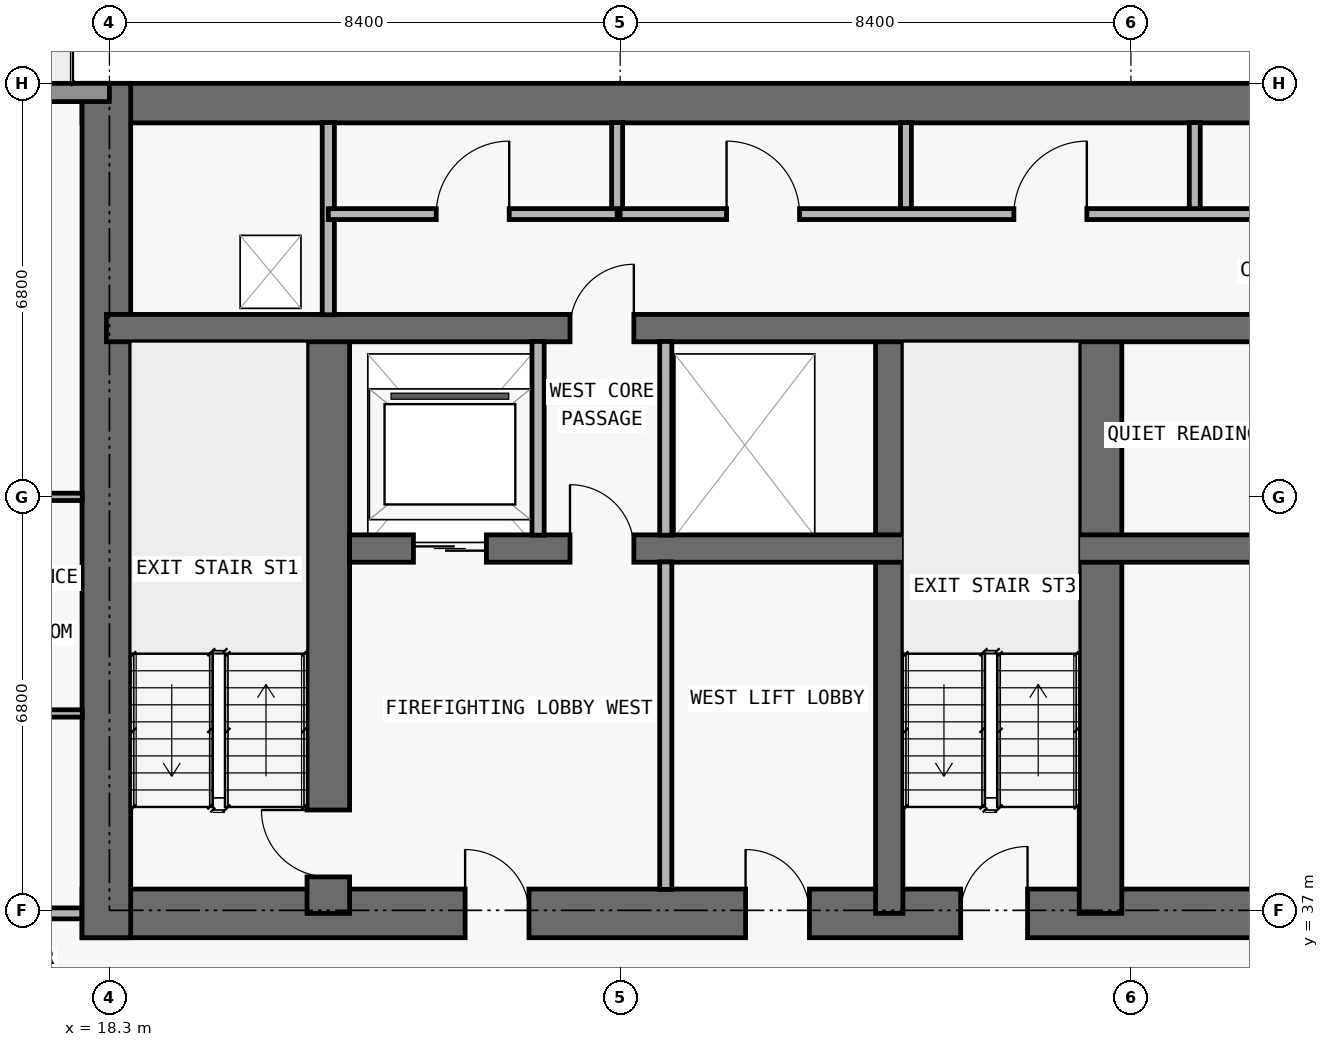
"""IFC4 building model, lengths in metres.
Left out: names, types, materials, properties, quantities, classifications, styles, units other than length and angle.
Written with IfcOpenShell. Run it as: python <this file> out.ifc"""

import sys

from ifc_helpers import new_model, si_unit, direction, frame, frame_2d, origin, place, context, subcontext, project, spatial, rectangle, extrude, element, fill, save


model = new_model("IFC4")
c1 = context("Model", 3, precision=1e-05, world=origin(), true_north=direction((0.0, 1.0)))
c2 = subcontext(c1, "Body", "Model", "MODEL_VIEW")
j1 = project(units=[si_unit("LENGTHUNIT", "METRE"), si_unit("PLANEANGLEUNIT", "RADIAN")], contexts=[c1])
p1 = place(None, origin())
s1 = spatial("IfcSite", under=j1, at=p1, CompositionType="ELEMENT")
p2 = place(p1, origin())
s2 = spatial("IfcBuilding", under=s1, at=p2, CompositionType="ELEMENT")
p3 = place(p2, frame((0.0, 0.0, 129.0)))
s3 = spatial("IfcBuildingStorey", under=s2, at=p3, CompositionType="ELEMENT", Elevation=129.0)
p4 = place(p3, frame((17.85, 36.95, 0.0), z_axis=(0.0, 0.0, 1.0), x_axis=(1.0, 0.0, 0.0)))
e1 = element("IfcWall", 1, at=p4, inside=s3, PredefinedType="SHEAR", context=c2, shape_type="SweptSolid", body=[
    extrude(rectangle(XDim=42.1, YDim=0.8, at=frame_2d((21.05, 0.0))), origin(), (0.0, 0.0, 1.0), 3.05),
])
p5 = place(p4, frame((14.45, 0.0, 0.0)))
e2 = element("IfcOpeningElement", 2, at=p5, cuts=e1, PredefinedType="OPENING", context=c2, shape_type="SweptSolid", body=[
    extrude(rectangle(XDim=1.1, YDim=2.15, at=frame_2d((0.55, 1.075))), frame((0.0, 0.41, 0.0), z_axis=(0.0, -1.0, 0.0), x_axis=(1.0, 0.0, 0.0)), (0.0, 0.0, 1.0), 0.82),
])
p6 = place(p4, frame((6.3, 0.0, 0.0)))
e3 = element("IfcOpeningElement", 3, at=p6, cuts=e1, PredefinedType="OPENING", context=c2, shape_type="SweptSolid", body=[
    extrude(rectangle(XDim=1.05, YDim=2.15, at=frame_2d((0.525, 1.075))), frame((0.0, 0.41, 0.0), z_axis=(0.0, -1.0, 0.0), x_axis=(1.0, 0.0, 0.0)), (0.0, 0.0, 1.0), 0.82),
])
p7 = place(p4, frame((34.8, 0.0, 0.0)))
e4 = element("IfcOpeningElement", 4, at=p7, cuts=e1, PredefinedType="OPENING", context=c2, shape_type="SweptSolid", body=[
    extrude(rectangle(XDim=1.05, YDim=2.15, at=frame_2d((0.525, 1.075))), frame((0.0, 0.41, 0.0), z_axis=(0.0, -1.0, 0.0), x_axis=(1.0, 0.0, 0.0)), (0.0, 0.0, 1.0), 0.82),
])
p8 = place(p4, frame((10.913, 0.0, 0.0)))
e5 = element("IfcOpeningElement", 5, at=p8, cuts=e1, PredefinedType="OPENING", context=c2, shape_type="SweptSolid", body=[
    extrude(rectangle(XDim=1.05, YDim=2.15, at=frame_2d((0.525, 1.075))), frame((0.0, 0.41, 0.0), z_axis=(0.0, -1.0, 0.0), x_axis=(1.0, 0.0, 0.0)), (0.0, 0.0, 1.0), 0.82),
])
p9 = place(p4, frame((24.15, 0.0, 0.0)))
e6 = element("IfcOpeningElement", 6, at=p9, cuts=e1, PredefinedType="OPENING", context=c2, shape_type="SweptSolid", body=[
    extrude(rectangle(XDim=1.05, YDim=2.15, at=frame_2d((0.525, 1.075))), frame((0.0, 0.41, 0.0), z_axis=(0.0, -1.0, 0.0), x_axis=(1.0, 0.0, 0.0)), (0.0, 0.0, 1.0), 0.82),
])
p10 = place(p3, frame((17.85, 50.275, 0.0), z_axis=(0.0, 0.0, 1.0), x_axis=(1.0, 0.0, 0.0)))
e7 = element("IfcWall", 7, at=p10, inside=s3, PredefinedType="SHEAR", context=c2, shape_type="SweptSolid", body=[
    extrude(rectangle(XDim=42.1, YDim=0.65, at=frame_2d((21.05, 0.0))), origin(), (0.0, 0.0, 1.0), 3.05),
])
p11 = place(p3, frame((18.25, 36.55, 0.0), z_axis=(0.0, 0.0, 1.0), x_axis=(0.0, 1.0, 0.0)))
e8 = element("IfcWall", 8, at=p11, inside=s3, PredefinedType="SHEAR", context=c2, shape_type="SweptSolid", body=[
    extrude(rectangle(XDim=14.05, YDim=0.8, at=frame_2d((7.025, 0.0))), origin(), (0.0, 0.0, 1.0), 3.05),
])
p12 = place(p3, frame((21.9, 36.95, 0.0), z_axis=(0.0, 0.0, 1.0), x_axis=(0.0, 1.0, 0.0)))
e9 = element("IfcWall", 9, at=p12, inside=s3, PredefinedType="SHEAR", context=c2, shape_type="SweptSolid", body=[
    extrude(rectangle(XDim=9.625, YDim=0.7, at=frame_2d((4.812, 0.0))), origin(), (0.0, 0.0, 1.0), 3.05),
])
p13 = place(p12, frame((0.6, 0.0, 0.0)))
e10 = element("IfcOpeningElement", 10, at=p13, cuts=e9, PredefinedType="OPENING", context=c2, shape_type="SweptSolid", body=[
    extrude(rectangle(XDim=1.1, YDim=2.15, at=frame_2d((0.55, 1.075))), frame((0.0, 0.36, 0.0), z_axis=(0.0, -1.0, 0.0), x_axis=(1.0, 0.0, 0.0)), (0.0, 0.0, 1.0), 0.72),
])
p14 = place(p3, frame((31.125, 36.95, 0.0), z_axis=(0.0, 0.0, 1.0), x_axis=(0.0, 1.0, 0.0)))
e11 = element("IfcWall", 11, at=p14, inside=s3, PredefinedType="SHEAR", context=c2, shape_type="SweptSolid", body=[
    extrude(rectangle(XDim=9.625, YDim=0.45, at=frame_2d((4.812, 0.0))), origin(), (0.0, 0.0, 1.0), 3.05),
])
p15 = place(p3, frame((34.6, 36.95, 0.0), z_axis=(0.0, 0.0, 1.0), x_axis=(0.0, 1.0, 0.0)))
e12 = element("IfcWall", 12, at=p15, inside=s3, PredefinedType="SHEAR", context=c2, shape_type="SweptSolid", body=[
    extrude(rectangle(XDim=9.625, YDim=0.7, at=frame_2d((4.812, 0.0))), origin(), (0.0, 0.0, 1.0), 3.05),
])
p16 = place(p3, frame((22.25, 42.95, 0.0), z_axis=(0.0, 0.0, 1.0), x_axis=(1.0, 0.0, 0.0)))
e13 = element("IfcWall", 13, at=p16, inside=s3, PredefinedType="SHEAR", context=c2, shape_type="SweptSolid", body=[
    extrude(rectangle(XDim=33.3, YDim=0.45, at=frame_2d((16.65, 0.0))), origin(), (0.0, 0.0, 1.0), 3.05),
])
p17 = place(p16, frame((1.05, 0.0, 0.0)))
e14 = element("IfcOpeningElement", 14, at=p17, cuts=e13, PredefinedType="OPENING", context=c2, shape_type="SweptSolid", body=[
    extrude(rectangle(XDim=1.2, YDim=2.2, at=frame_2d((0.6, 1.1))), frame((0.0, 0.235, 0.0), z_axis=(0.0, -1.0, 0.0), x_axis=(1.0, 0.0, 0.0)), (0.0, 0.0, 1.0), 0.47),
])
p18 = place(p16, frame((31.05, 0.0, 0.0)))
e15 = element("IfcOpeningElement", 15, at=p18, cuts=e13, PredefinedType="OPENING", context=c2, shape_type="SweptSolid", body=[
    extrude(rectangle(XDim=1.2, YDim=2.2, at=frame_2d((0.6, 1.1))), frame((0.0, 0.235, 0.0), z_axis=(0.0, -1.0, 0.0), x_axis=(1.0, 0.0, 0.0)), (0.0, 0.0, 1.0), 0.47),
])
p19 = place(p16, frame((21.4, 0.0, 0.0)))
e16 = element("IfcOpeningElement", 16, at=p19, cuts=e13, PredefinedType="OPENING", context=c2, shape_type="SweptSolid", body=[
    extrude(rectangle(XDim=1.1, YDim=2.2, at=frame_2d((0.55, 1.1))), frame((0.0, 0.235, 0.0), z_axis=(0.0, -1.0, 0.0), x_axis=(1.0, 0.0, 0.0)), (0.0, 0.0, 1.0), 0.47),
])
p20 = place(p16, frame((24.0, 0.0, 0.0)))
e17 = element("IfcOpeningElement", 17, at=p20, cuts=e13, PredefinedType="OPENING", context=c2, shape_type="SweptSolid", body=[
    extrude(rectangle(XDim=1.1, YDim=2.2, at=frame_2d((0.55, 1.1))), frame((0.0, 0.235, 0.0), z_axis=(0.0, -1.0, 0.0), x_axis=(1.0, 0.0, 0.0)), (0.0, 0.0, 1.0), 0.47),
])
p21 = place(p16, frame((3.625, 0.0, 0.0)))
e18 = element("IfcOpeningElement", 18, at=p21, cuts=e13, PredefinedType="OPENING", context=c2, shape_type="SweptSolid", body=[
    extrude(rectangle(XDim=1.05, YDim=2.15, at=frame_2d((0.525, 1.075))), frame((0.0, 0.235, 0.0), z_axis=(0.0, -1.0, 0.0), x_axis=(1.0, 0.0, 0.0)), (0.0, 0.0, 1.0), 0.47),
])
p22 = place(p16, frame((28.675, 0.0, 0.0)))
e19 = element("IfcOpeningElement", 19, at=p22, cuts=e13, PredefinedType="OPENING", context=c2, shape_type="SweptSolid", body=[
    extrude(rectangle(XDim=1.05, YDim=2.15, at=frame_2d((0.525, 1.075))), frame((0.0, 0.235, 0.0), z_axis=(0.0, -1.0, 0.0), x_axis=(1.0, 0.0, 0.0)), (0.0, 0.0, 1.0), 0.47),
])
p23 = place(p16, frame((15.975, 0.0, 0.0)))
e20 = element("IfcOpeningElement", 20, at=p23, cuts=e13, PredefinedType="OPENING", context=c2, shape_type="SweptSolid", body=[
    extrude(rectangle(XDim=1.0, YDim=2.2, at=frame_2d((0.5, 1.1))), frame((0.0, 0.235, 0.0), z_axis=(0.0, -1.0, 0.0), x_axis=(1.0, 0.0, 0.0)), (0.0, 0.0, 1.0), 0.47),
])
p24 = place(p3, frame((18.25, 46.575, 0.0), z_axis=(0.0, 0.0, 1.0), x_axis=(1.0, 0.0, 0.0)))
e21 = element("IfcWall", 21, at=p24, inside=s3, PredefinedType="SHEAR", context=c2, shape_type="SweptSolid", body=[
    extrude(rectangle(XDim=41.3, YDim=0.45, at=frame_2d((20.65, 0.0))), origin(), (0.0, 0.0, 1.0), 3.05),
])
p25 = place(p24, frame((7.625, 0.0, 0.0)))
e22 = element("IfcOpeningElement", 22, at=p25, cuts=e21, PredefinedType="OPENING", context=c2, shape_type="SweptSolid", body=[
    extrude(rectangle(XDim=1.05, YDim=2.15, at=frame_2d((0.525, 1.075))), frame((0.0, 0.235, 0.0), z_axis=(0.0, -1.0, 0.0), x_axis=(1.0, 0.0, 0.0)), (0.0, 0.0, 1.0), 0.47),
])
p26 = place(p24, frame((32.675, 0.0, 0.0)))
e23 = element("IfcOpeningElement", 23, at=p26, cuts=e21, PredefinedType="OPENING", context=c2, shape_type="SweptSolid", body=[
    extrude(rectangle(XDim=1.05, YDim=2.15, at=frame_2d((0.525, 1.075))), frame((0.0, 0.235, 0.0), z_axis=(0.0, -1.0, 0.0), x_axis=(1.0, 0.0, 0.0)), (0.0, 0.0, 1.0), 0.47),
])
p27 = place(p3, frame((7.7, 50.45, 0.0), z_axis=(0.0, 0.0, 1.0), x_axis=(1.0, 0.0, 0.0)))
e24 = element("IfcWall", 24, at=p27, inside=s3, PredefinedType="STANDARD", context=c2, shape_type="SweptSolid", body=[
    extrude(rectangle(XDim=10.6, YDim=0.3, at=frame_2d((5.3, 0.0))), origin(), (0.0, 0.0, 1.0), 3.05),
])
p28 = place(p27, frame((4.3, 0.0, 0.0)))
e25 = element("IfcOpeningElement", 25, at=p28, cuts=e24, PredefinedType="OPENING", context=c2, shape_type="SweptSolid", body=[
    extrude(rectangle(XDim=2.0, YDim=2.3, at=frame_2d((1.0, 1.15))), frame((0.0, 0.16, 0.0), z_axis=(0.0, -1.0, 0.0), x_axis=(1.0, 0.0, 0.0)), (0.0, 0.0, 1.0), 0.32),
])
p29 = place(p3, frame((21.9, 46.795, 0.0), z_axis=(0.0, 0.0, 1.0), x_axis=(0.0, 1.0, 0.0)))
e26 = element("IfcWall", 26, at=p29, inside=s3, PredefinedType="PARTITIONING", context=c2, shape_type="SweptSolid", body=[
    extrude(rectangle(XDim=3.16, YDim=0.2, at=frame_2d((1.58, 0.0))), origin(), (0.0, 0.0, 1.0), 3.05),
])
p30 = place(p3, frame((25.35, 43.17, 0.0), z_axis=(0.0, 0.0, 1.0), x_axis=(0.0, 1.0, 0.0)))
e27 = element("IfcWall", 27, at=p30, inside=s3, PredefinedType="PARTITIONING", context=c2, shape_type="SweptSolid", body=[
    extrude(rectangle(XDim=3.185, YDim=0.2, at=frame_2d((1.593, 0.0))), origin(), (0.0, 0.0, 1.0), 3.05),
])
p31 = place(p3, frame((26.65, 48.45, 0.0), z_axis=(0.0, 0.0, 1.0), x_axis=(0.0, 1.0, 0.0)))
e28 = element("IfcWall", 28, at=p31, inside=s3, PredefinedType="PARTITIONING", context=c2, shape_type="SweptSolid", body=[
    extrude(rectangle(XDim=1.505, YDim=0.18, at=frame_2d((0.752, 0.0))), origin(), (0.0, 0.0, 1.0), 3.05),
])
p32 = place(p3, frame((27.45, 37.345, 0.0), z_axis=(0.0, 0.0, 1.0), x_axis=(0.0, 1.0, 0.0)))
e29 = element("IfcWall", 29, at=p32, inside=s3, PredefinedType="PARTITIONING", context=c2, shape_type="SweptSolid", body=[
    extrude(rectangle(XDim=5.385, YDim=0.2, at=frame_2d((2.692, 0.0))), origin(), (0.0, 0.0, 1.0), 3.05),
])
p33 = place(p3, frame((27.45, 43.17, 0.0), z_axis=(0.0, 0.0, 1.0), x_axis=(0.0, 1.0, 0.0)))
e30 = element("IfcWall", 30, at=p33, inside=s3, PredefinedType="PARTITIONING", context=c2, shape_type="SweptSolid", body=[
    extrude(rectangle(XDim=3.185, YDim=0.2, at=frame_2d((1.593, 0.0))), origin(), (0.0, 0.0, 1.0), 3.05),
])
for number, where, z_axis, x_axis in (
    (31, (31.4, 48.45, 0.0), (0.0, 0.0, 1.0), (0.0, 1.0, 0.0)),
    (32, (36.15, 48.45, 0.0), (0.0, 0.0, 1.0), (0.0, 1.0, 0.0)),
):
    element("IfcWall", number, at=place(p3, frame(where, z_axis=z_axis, x_axis=x_axis)), inside=s3, PredefinedType="PARTITIONING", context=c2, shape_type="SweptSolid", body=[
        extrude(rectangle(XDim=1.505, YDim=0.18, at=frame_2d((0.752, 0.0))), origin(), (0.0, 0.0, 1.0), 3.05),
    ])
p34 = place(p3, frame((7.7, 36.95, 0.0), z_axis=(0.0, 0.0, 1.0), x_axis=(1.0, 0.0, 0.0)))
e33 = element("IfcWall", 33, at=p34, inside=s3, PredefinedType="PARTITIONING", context=c2, shape_type="SweptSolid", body=[
    extrude(rectangle(XDim=10.145, YDim=0.18, at=frame_2d((5.073, 0.0))), origin(), (0.0, 0.0, 1.0), 3.05),
])
p35 = place(p34, frame((5.188, 0.0, 0.0)))
e34 = element("IfcOpeningElement", 34, at=p35, cuts=e33, PredefinedType="OPENING", context=c2, shape_type="SweptSolid", body=[
    extrude(rectangle(XDim=1.0, YDim=2.2, at=frame_2d((0.5, 1.1))), frame((0.0, 0.1, 0.0), z_axis=(0.0, -1.0, 0.0), x_axis=(1.0, 0.0, 0.0)), (0.0, 0.0, 1.0), 0.2),
])
p36 = place(p3, frame((15.6, 40.238, 0.0), z_axis=(0.0, 0.0, 1.0), x_axis=(1.0, 0.0, 0.0)))
e35 = element("IfcWall", 35, at=p36, inside=s3, PredefinedType="PARTITIONING", context=c2, shape_type="SweptSolid", body=[
    extrude(rectangle(XDim=2.255, YDim=0.12, at=frame_2d((1.127, 0.0))), origin(), (0.0, 0.0, 1.0), 3.05),
])
p37 = place(p3, frame((4.195, 43.8, 0.0), z_axis=(0.0, 0.0, 1.0), x_axis=(1.0, 0.0, 0.0)))
e36 = element("IfcWall", 36, at=p37, inside=s3, PredefinedType="PARTITIONING", context=c2, shape_type="SweptSolid", body=[
    extrude(rectangle(XDim=13.66, YDim=0.12, at=frame_2d((6.83, 0.0))), origin(), (0.0, 0.0, 1.0), 2.339),
])
p38 = place(p37, frame((8.743, 0.0, 0.0)))
e37 = element("IfcOpeningElement", 37, at=p38, cuts=e36, PredefinedType="OPENING", context=c2, shape_type="SweptSolid", body=[
    extrude(rectangle(XDim=0.9, YDim=2.15, at=frame_2d((0.45, 1.075))), frame((0.0, 0.07, 0.0), z_axis=(0.0, -1.0, 0.0), x_axis=(1.0, 0.0, 0.0)), (0.0, 0.0, 1.0), 0.14),
])
p39 = place(p37, frame((12.107, 0.0, 0.0)))
e38 = element("IfcOpeningElement", 38, at=p39, cuts=e36, PredefinedType="OPENING", context=c2, shape_type="SweptSolid", body=[
    extrude(rectangle(XDim=0.85, YDim=2.1, at=frame_2d((0.425, 1.05))), frame((0.0, 0.07, 0.0), z_axis=(0.0, -1.0, 0.0), x_axis=(1.0, 0.0, 0.0)), (0.0, 0.0, 1.0), 0.14),
])
p40 = place(p3, frame((21.9, 48.45, 0.0), z_axis=(0.0, 0.0, 1.0), x_axis=(1.0, 0.0, 0.0)))
e39 = element("IfcWall", 39, at=p40, inside=s3, PredefinedType="PARTITIONING", context=c2, shape_type="SweptSolid", body=[
    extrude(rectangle(XDim=4.75, YDim=0.18, at=frame_2d((2.375, 0.0))), origin(), (0.0, 0.0, 1.0), 3.05),
])
p41 = place(p40, frame((1.775, 0.0, 0.0)))
e40 = element("IfcOpeningElement", 40, at=p41, cuts=e39, PredefinedType="OPENING", context=c2, shape_type="SweptSolid", body=[
    extrude(rectangle(XDim=1.2, YDim=2.2, at=frame_2d((0.6, 1.1))), frame((0.0, 0.1, 0.0), z_axis=(0.0, -1.0, 0.0), x_axis=(1.0, 0.0, 0.0)), (0.0, 0.0, 1.0), 0.2),
])
p42 = place(p3, frame((26.7, 48.45, 0.0), z_axis=(0.0, 0.0, 1.0), x_axis=(1.0, 0.0, 0.0)))
e41 = element("IfcWall", 41, at=p42, inside=s3, PredefinedType="PARTITIONING", context=c2, shape_type="SweptSolid", body=[
    extrude(rectangle(XDim=29.2, YDim=0.18, at=frame_2d((14.6, 0.0))), origin(), (0.0, 0.0, 1.0), 3.05),
])
p43 = place(p42, frame((1.75, 0.0, 0.0)))
e42 = element("IfcOpeningElement", 42, at=p43, cuts=e41, PredefinedType="OPENING", context=c2, shape_type="SweptSolid", body=[
    extrude(rectangle(XDim=1.2, YDim=2.2, at=frame_2d((0.6, 1.1))), frame((0.0, 0.1, 0.0), z_axis=(0.0, -1.0, 0.0), x_axis=(1.0, 0.0, 0.0)), (0.0, 0.0, 1.0), 0.2),
])
p44 = place(p42, frame((6.475, 0.0, 0.0)))
e43 = element("IfcOpeningElement", 43, at=p44, cuts=e41, PredefinedType="OPENING", context=c2, shape_type="SweptSolid", body=[
    extrude(rectangle(XDim=1.2, YDim=2.2, at=frame_2d((0.6, 1.1))), frame((0.0, 0.1, 0.0), z_axis=(0.0, -1.0, 0.0), x_axis=(1.0, 0.0, 0.0)), (0.0, 0.0, 1.0), 0.2),
])
p45 = place(p42, frame((14.05, 0.0, 0.0)))
e44 = element("IfcOpeningElement", 44, at=p45, cuts=e41, PredefinedType="OPENING", context=c2, shape_type="SweptSolid", body=[
    extrude(rectangle(XDim=1.0, YDim=2.2, at=frame_2d((0.5, 1.1))), frame((0.0, 0.1, 0.0), z_axis=(0.0, -1.0, 0.0), x_axis=(1.0, 0.0, 0.0)), (0.0, 0.0, 1.0), 0.2),
])
p46 = place(p42, frame((21.425, 0.0, 0.0)))
e45 = element("IfcOpeningElement", 45, at=p46, cuts=e41, PredefinedType="OPENING", context=c2, shape_type="SweptSolid", body=[
    extrude(rectangle(XDim=1.2, YDim=2.2, at=frame_2d((0.6, 1.1))), frame((0.0, 0.1, 0.0), z_axis=(0.0, -1.0, 0.0), x_axis=(1.0, 0.0, 0.0)), (0.0, 0.0, 1.0), 0.2),
])
p47 = place(p42, frame((26.375, 0.0, 0.0)))
e46 = element("IfcOpeningElement", 46, at=p47, cuts=e41, PredefinedType="OPENING", context=c2, shape_type="SweptSolid", body=[
    extrude(rectangle(XDim=0.85, YDim=2.1, at=frame_2d((0.425, 1.05))), frame((0.0, 0.1, 0.0), z_axis=(0.0, -1.0, 0.0), x_axis=(1.0, 0.0, 0.0)), (0.0, 0.0, 1.0), 0.2),
])
p48 = place(p17, origin())
e47 = element("IfcDoor", 47, at=p48, inside=s3, OperationType="DOUBLE_DOOR_SLIDING", PredefinedType="DOOR", context=c2, shape_type="SweptSolid", body=[
    extrude(rectangle(XDim=1.2, YDim=2.2, at=frame_2d((0.6, 1.1))), frame((0.0, 0.025, 0.0), z_axis=(0.0, -1.0, 0.0), x_axis=(1.0, 0.0, 0.0)), (0.0, 0.0, 1.0), 0.05),
])
fill(e14, e47)
p49 = place(p5, origin())
e48 = element("IfcDoor", 48, at=p49, inside=s3, OperationType="SINGLE_SWING_RIGHT", PredefinedType="DOOR", context=c2, shape_type="SweptSolid", body=[
    extrude(rectangle(XDim=1.1, YDim=2.15, at=frame_2d((0.55, 1.075))), frame((0.0, 0.025, 0.0), z_axis=(0.0, -1.0, 0.0), x_axis=(1.0, 0.0, 0.0)), (0.0, 0.0, 1.0), 0.05),
])
fill(e2, e48)
p50 = place(p6, origin())
e49 = element("IfcDoor", 49, at=p50, inside=s3, OperationType="SINGLE_SWING_LEFT", PredefinedType="DOOR", context=c2, shape_type="SweptSolid", body=[
    extrude(rectangle(XDim=1.05, YDim=2.15, at=frame_2d((0.525, 1.075))), frame((0.0, 0.025, 0.0), z_axis=(0.0, -1.0, 0.0), x_axis=(1.0, 0.0, 0.0)), (0.0, 0.0, 1.0), 0.05),
])
fill(e3, e49)
p51 = place(p13, origin())
e50 = element("IfcDoor", 50, at=p51, inside=s3, OperationType="SINGLE_SWING_RIGHT", PredefinedType="DOOR", context=c2, shape_type="SweptSolid", body=[
    extrude(rectangle(XDim=1.1, YDim=2.15, at=frame_2d((0.55, 1.075))), frame((0.0, 0.025, 0.0), z_axis=(0.0, -1.0, 0.0), x_axis=(1.0, 0.0, 0.0)), (0.0, 0.0, 1.0), 0.05),
])
fill(e10, e50)
p52 = place(p21, origin())
e51 = element("IfcDoor", 51, at=p52, inside=s3, OperationType="SINGLE_SWING_LEFT", PredefinedType="DOOR", context=c2, shape_type="SweptSolid", body=[
    extrude(rectangle(XDim=1.05, YDim=2.15, at=frame_2d((0.525, 1.075))), frame((0.0, 0.025, 0.0), z_axis=(0.0, -1.0, 0.0), x_axis=(1.0, 0.0, 0.0)), (0.0, 0.0, 1.0), 0.05),
])
fill(e18, e51)
p53 = place(p8, origin())
e52 = element("IfcDoor", 52, at=p53, inside=s3, OperationType="SINGLE_SWING_LEFT", PredefinedType="DOOR", context=c2, shape_type="SweptSolid", body=[
    extrude(rectangle(XDim=1.05, YDim=2.15, at=frame_2d((0.525, 1.075))), frame((0.0, 0.025, 0.0), z_axis=(0.0, -1.0, 0.0), x_axis=(1.0, 0.0, 0.0)), (0.0, 0.0, 1.0), 0.05),
])
fill(e5, e52)
p54 = place(p25, origin())
e53 = element("IfcDoor", 53, at=p54, inside=s3, OperationType="SINGLE_SWING_RIGHT", PredefinedType="DOOR", context=c2, shape_type="SweptSolid", body=[
    extrude(rectangle(XDim=1.05, YDim=2.15, at=frame_2d((0.525, 1.075))), frame((0.0, 0.025, 0.0), z_axis=(0.0, -1.0, 0.0), x_axis=(1.0, 0.0, 0.0)), (0.0, 0.0, 1.0), 0.05),
])
fill(e22, e53)
p55 = place(p41, origin())
e54 = element("IfcDoor", 54, at=p55, inside=s3, OperationType="SINGLE_SWING_RIGHT", PredefinedType="DOOR", context=c2, shape_type="SweptSolid", body=[
    extrude(rectangle(XDim=1.2, YDim=2.2, at=frame_2d((0.6, 1.1))), frame((0.0, 0.025, 0.0), z_axis=(0.0, -1.0, 0.0), x_axis=(1.0, 0.0, 0.0)), (0.0, 0.0, 1.0), 0.05),
])
fill(e40, e54)
p56 = place(p43, origin())
e55 = element("IfcDoor", 55, at=p56, inside=s3, OperationType="SINGLE_SWING_LEFT", PredefinedType="DOOR", context=c2, shape_type="SweptSolid", body=[
    extrude(rectangle(XDim=1.2, YDim=2.2, at=frame_2d((0.6, 1.1))), frame((0.0, 0.025, 0.0), z_axis=(0.0, -1.0, 0.0), x_axis=(1.0, 0.0, 0.0)), (0.0, 0.0, 1.0), 0.05),
])
fill(e42, e55)
p57 = place(p44, origin())
e56 = element("IfcDoor", 56, at=p57, inside=s3, OperationType="SINGLE_SWING_RIGHT", PredefinedType="DOOR", context=c2, shape_type="SweptSolid", body=[
    extrude(rectangle(XDim=1.2, YDim=2.2, at=frame_2d((0.6, 1.1))), frame((0.0, 0.025, 0.0), z_axis=(0.0, -1.0, 0.0), x_axis=(1.0, 0.0, 0.0)), (0.0, 0.0, 1.0), 0.05),
])
fill(e43, e56)
save(model, sys.argv[1])
